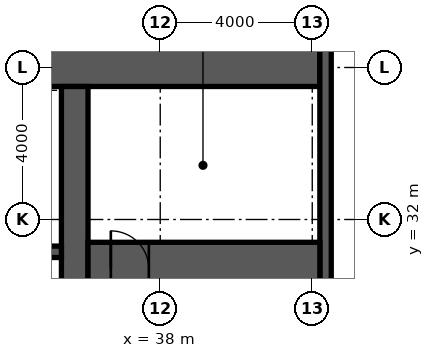
"""IFC4 building model, lengths in metres.
Left out: names, types, materials, properties, quantities, classifications, styles, units other than length and angle.
Written with IfcOpenShell. Run it as: python <this file> out.ifc"""

import sys

from ifc_helpers import new_model, si_unit, direction, frame, frame_2d, origin, place, context, subcontext, project, spatial, rectangle, extrude, element, fill, save


model = new_model("IFC4")
c1 = context("Model", 3, precision=1e-05, world=origin(), true_north=direction((0.0, 1.0)))
c2 = subcontext(c1, "Body", "Model", "MODEL_VIEW")
j1 = project(units=[si_unit("LENGTHUNIT", "METRE"), si_unit("PLANEANGLEUNIT", "RADIAN")], contexts=[c1])
p1 = place(None, origin())
s1 = spatial("IfcSite", under=j1, at=p1, CompositionType="ELEMENT")
p2 = place(p1, origin())
s2 = spatial("IfcBuilding", under=s1, at=p2, CompositionType="ELEMENT")
p3 = place(p2, frame((0.0, 0.0, 63.0)))
s3 = spatial("IfcBuildingStorey", under=s2, at=p3, CompositionType="ELEMENT", Elevation=63.0)
p4 = place(p3, frame((18.5, 36.2, -0.15), z_axis=(0.0, 0.0, 1.0), x_axis=(1.0, 0.0, 0.0)))
e1 = element("IfcWall", 1, at=p4, inside=s3, PredefinedType="SHEAR", context=c2, shape_type="SweptSolid", body=[
    extrude(rectangle(XDim=23.7, YDim=1.4, at=frame_2d((11.85, 0.0))), origin(), (0.0, 0.0, 1.0), 4.0),
])
p5 = place(p3, frame((42.35, 17.1, -0.15), z_axis=(0.0, 0.0, 1.0), x_axis=(0.0, 1.0, 0.0)))
e2 = element("IfcWall", 2, at=p5, inside=s3, PredefinedType="SHEAR", context=c2, shape_type="SweptSolid", body=[
    extrude(rectangle(XDim=19.8, YDim=0.3, at=frame_2d((9.9, 0.0))), origin(), (0.0, 0.0, 1.0), 4.0),
])
p6 = place(p3, frame((35.75, 18.5, -0.15), z_axis=(0.0, 0.0, 1.0), x_axis=(0.0, 1.0, 0.0)))
e3 = element("IfcWall", 3, at=p6, inside=s3, PredefinedType="SHEAR", context=c2, shape_type="SweptSolid", body=[
    extrude(rectangle(XDim=17.0, YDim=0.7, at=frame_2d((8.5, 0.0))), origin(), (0.0, 0.0, 1.0), 4.0),
])
p7 = place(p6, frame((9.85, 0.0, 0.15)))
e4 = element("IfcOpeningElement", 4, at=p7, cuts=e3, PredefinedType="OPENING", context=c2, shape_type="SweptSolid", body=[
    extrude(rectangle(XDim=1.0, YDim=2.2, at=frame_2d((0.5, 1.1))), frame((0.0, 0.36, 0.0), z_axis=(0.0, -1.0, 0.0), x_axis=(1.0, 0.0, 0.0)), (0.0, 0.0, 1.0), 0.72),
])
p8 = place(p3, frame((24.15, 31.15, -0.15), z_axis=(0.0, 0.0, 1.0), x_axis=(1.0, 0.0, 0.0)))
e5 = element("IfcWall", 5, at=p8, inside=s3, PredefinedType="SHEAR", context=c2, shape_type="SweptSolid", body=[
    extrude(rectangle(XDim=11.25, YDim=0.3, at=frame_2d((5.625, 0.0))), origin(), (0.0, 0.0, 1.0), 4.0),
])
p9 = place(p8, frame((7.25, 0.0, 0.15)))
e6 = element("IfcOpeningElement", 6, at=p9, cuts=e5, PredefinedType="OPENING", context=c2, shape_type="SweptSolid", body=[
    extrude(rectangle(XDim=1.4, YDim=2.4, at=frame_2d((0.7, 1.2))), frame((0.0, 0.16, 0.0), z_axis=(0.0, -1.0, 0.0), x_axis=(1.0, 0.0, 0.0)), (0.0, 0.0, 1.0), 0.32),
])
p10 = place(p3, frame((36.1, 30.7, -0.15), z_axis=(0.0, 0.0, 1.0), x_axis=(1.0, 0.0, 0.0)))
e7 = element("IfcWall", 7, at=p10, inside=s3, PredefinedType="SHEAR", context=c2, shape_type="SweptSolid", body=[
    extrude(rectangle(XDim=6.1, YDim=1.4, at=frame_2d((3.05, 0.0))), origin(), (0.0, 0.0, 1.0), 4.0),
])
p11 = place(p10, frame((0.6, 0.0, 0.15)))
e8 = element("IfcOpeningElement", 8, at=p11, cuts=e7, PredefinedType="OPENING", context=c2, shape_type="SweptSolid", body=[
    extrude(rectangle(XDim=1.0, YDim=2.2, at=frame_2d((0.5, 1.1))), frame((0.0, 0.71, 0.0), z_axis=(0.0, -1.0, 0.0), x_axis=(1.0, 0.0, 0.0)), (0.0, 0.0, 1.0), 1.42),
])
p12 = place(p11, origin())
e9 = element("IfcDoor", 9, at=p12, inside=s3, OperationType="SINGLE_SWING_LEFT", PredefinedType="DOOR", context=c2, shape_type="SweptSolid", body=[
    extrude(rectangle(XDim=1.0, YDim=2.2, at=frame_2d((0.5, 1.1))), frame((0.0, 0.025, 0.0), z_axis=(0.0, -1.0, 0.0), x_axis=(1.0, 0.0, 0.0)), (0.0, 0.0, 1.0), 0.05),
])
fill(e8, e9)
save(model, sys.argv[1])
